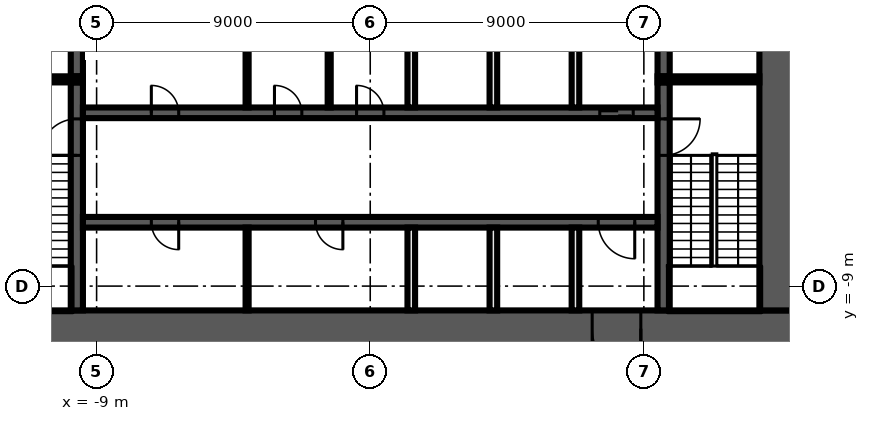
"""IFC4 building model, lengths in metres.
Left out: names, types, materials, properties, quantities, classifications, styles, units other than length and angle.
Written with IfcOpenShell. Run it as: python <this file> out.ifc"""

import sys

from ifc_helpers import new_model, si_unit, direction, frame, frame_2d, origin, place, context, subcontext, project, spatial, rectangle, extrude, element, fill, save


model = new_model("IFC4")
c1 = context("Model", 3, precision=1e-05, world=origin(), true_north=direction((0.0, 1.0)))
c2 = subcontext(c1, "Body", "Model", "MODEL_VIEW")
j1 = project(units=[si_unit("LENGTHUNIT", "METRE"), si_unit("PLANEANGLEUNIT", "RADIAN")], contexts=[c1])
p1 = place(None, origin())
s1 = spatial("IfcSite", under=j1, at=p1, CompositionType="ELEMENT")
p2 = place(p1, origin())
s2 = spatial("IfcBuilding", under=s1, at=p2, CompositionType="ELEMENT")
p3 = place(p2, frame((0.0, 0.0, 33.0)))
s3 = spatial("IfcBuildingStorey", under=s2, at=p3, CompositionType="ELEMENT", Elevation=33.0)
p4 = place(p3, frame((14.0, -10.4, 0.0), z_axis=(0.0, 0.0, 1.0), x_axis=(-1.0, 0.0, 0.0)))
e1 = element("IfcWall", 1, at=p4, inside=s3, PredefinedType="SHEAR", context=c2, shape_type="SweptSolid", body=[
    extrude(rectangle(XDim=28.0, YDim=1.2, at=frame_2d((14.0, 0.0))), origin(), (0.0, 0.0, 1.0), 4.6),
])
p5 = place(p4, frame((5.1, 0.0, 0.0)))
e2 = element("IfcOpeningElement", 2, at=p5, cuts=e1, PredefinedType="OPENING", context=c2, shape_type="SweptSolid", body=[
    extrude(rectangle(XDim=1.6, YDim=2.1, at=frame_2d((0.8, 1.05))), frame((0.0, 0.61, 0.0), z_axis=(0.0, -1.0, 0.0), x_axis=(1.0, 0.0, 0.0)), (0.0, 0.0, 1.0), 1.22),
])
p6 = place(p3, frame((13.4, 9.8, 0.0), z_axis=(0.0, 0.0, 1.0), x_axis=(0.0, -1.0, 0.0)))
e3 = element("IfcWall", 3, at=p6, inside=s3, PredefinedType="SHEAR", context=c2, shape_type="SweptSolid", body=[
    extrude(rectangle(XDim=19.6, YDim=1.2, at=frame_2d((9.8, 0.0))), origin(), (0.0, 0.0, 1.0), 4.6),
])
p7 = place(p3, frame((9.65, -2.3, 0.0), z_axis=(0.0, 0.0, 1.0), x_axis=(0.0, -1.0, 0.0)))
e4 = element("IfcWall", 4, at=p7, inside=s3, PredefinedType="SHEAR", context=c2, shape_type="SweptSolid", body=[
    extrude(rectangle(XDim=7.5, YDim=0.4, at=frame_2d((3.75, 0.0))), origin(), (0.0, 0.0, 1.0), 4.6),
])
p8 = place(p7, frame((1.2, 0.0, 0.0)))
e5 = element("IfcOpeningElement", 5, at=p8, cuts=e4, PredefinedType="OPENING", context=c2, shape_type="SweptSolid", body=[
    extrude(rectangle(XDim=1.2, YDim=2.1, at=frame_2d((0.6, 1.05))), frame((0.0, 0.21, 0.0), z_axis=(0.0, -1.0, 0.0), x_axis=(1.0, 0.0, 0.0)), (0.0, 0.0, 1.0), 0.42),
])
p9 = place(p3, frame((9.65, 2.1, 0.0), z_axis=(0.0, 0.0, 1.0), x_axis=(0.0, -1.0, 0.0)))
e6 = element("IfcWall", 6, at=p9, inside=s3, PredefinedType="SHEAR", context=c2, shape_type="SweptSolid", body=[
    extrude(rectangle(XDim=4.2, YDim=0.4, at=frame_2d((2.1, 0.0))), origin(), (0.0, 0.0, 1.0), 4.6),
])
p10 = place(p9, frame((0.15, 0.0, 0.0)))
e7 = element("IfcOpeningElement", 7, at=p10, cuts=e6, PredefinedType="OPENING", context=c2, shape_type="SweptSolid", body=[
    extrude(rectangle(XDim=0.9, YDim=2.1, at=frame_2d((0.45, 1.05))), frame((0.0, 0.21, 0.0), z_axis=(0.0, -1.0, 0.0), x_axis=(1.0, 0.0, 0.0)), (0.0, 0.0, 1.0), 0.42),
])
p11 = place(p3, frame((-9.65, -9.8, 0.0), z_axis=(0.0, 0.0, 1.0), x_axis=(0.0, 1.0, 0.0)))
e8 = element("IfcWall", 8, at=p11, inside=s3, PredefinedType="SHEAR", context=c2, shape_type="SweptSolid", body=[
    extrude(rectangle(XDim=7.5, YDim=0.4, at=frame_2d((3.75, 0.0))), origin(), (0.0, 0.0, 1.0), 4.6),
])
p12 = place(p11, frame((5.1, 0.0, 0.0)))
e9 = element("IfcOpeningElement", 9, at=p12, cuts=e8, PredefinedType="OPENING", context=c2, shape_type="SweptSolid", body=[
    extrude(rectangle(XDim=1.2, YDim=2.1, at=frame_2d((0.6, 1.05))), frame((0.0, 0.21, 0.0), z_axis=(0.0, -1.0, 0.0), x_axis=(1.0, 0.0, 0.0)), (0.0, 0.0, 1.0), 0.42),
])
p13 = place(p3, frame((-9.65, -2.1, 0.0), z_axis=(0.0, 0.0, 1.0), x_axis=(0.0, 1.0, 0.0)))
e10 = element("IfcWall", 10, at=p13, inside=s3, PredefinedType="SHEAR", context=c2, shape_type="SweptSolid", body=[
    extrude(rectangle(XDim=4.2, YDim=0.4, at=frame_2d((2.1, 0.0))), origin(), (0.0, 0.0, 1.0), 4.6),
])
for number, where, z_axis, x_axis in (
    (11, (9.45, -2.2, 0.0), (0.0, 0.0, 1.0), (1.0, 0.0, 0.0)),
    (12, (-9.45, -2.2, 0.0), (0.0, 0.0, 1.0), (-1.0, 0.0, 0.0)),
):
    element("IfcWall", number, at=place(p3, frame(where, z_axis=z_axis, x_axis=x_axis)), inside=s3, PredefinedType="SHEAR", context=c2, shape_type="SweptSolid", body=[
        extrude(rectangle(XDim=3.35, YDim=0.2, at=frame_2d((1.675, 0.0))), origin(), (0.0, 0.0, 1.0), 4.6),
    ])
p14 = place(p3, frame((-9.45, -3.3, 0.0), z_axis=(0.0, 0.0, 1.0), x_axis=(1.0, 0.0, 0.0)))
e13 = element("IfcWall", 13, at=p14, inside=s3, PredefinedType="SHEAR", context=c2, shape_type="SweptSolid", body=[
    extrude(rectangle(XDim=18.9, YDim=0.35, at=frame_2d((9.45, 0.0))), origin(), (0.0, 0.0, 1.0), 4.6),
])
p15 = place(p14, frame((17.0, 0.0, 0.0)))
e14 = element("IfcOpeningElement", 14, at=p15, cuts=e13, PredefinedType="OPENING", context=c2, shape_type="SweptSolid", body=[
    extrude(rectangle(XDim=1.1, YDim=2.1, at=frame_2d((0.55, 1.05))), frame((0.0, 0.185, 0.0), z_axis=(0.0, -1.0, 0.0), x_axis=(1.0, 0.0, 0.0)), (0.0, 0.0, 1.0), 0.37),
])
p16 = place(p14, frame((2.25, 0.0, 0.0)))
e15 = element("IfcOpeningElement", 15, at=p16, cuts=e13, PredefinedType="OPENING", context=c2, shape_type="SweptSolid", body=[
    extrude(rectangle(XDim=0.9, YDim=2.1, at=frame_2d((0.45, 1.05))), frame((0.0, 0.185, 0.0), z_axis=(0.0, -1.0, 0.0), x_axis=(1.0, 0.0, 0.0)), (0.0, 0.0, 1.0), 0.37),
])
p17 = place(p14, frame((6.3, 0.0, 0.0)))
e16 = element("IfcOpeningElement", 16, at=p17, cuts=e13, PredefinedType="OPENING", context=c2, shape_type="SweptSolid", body=[
    extrude(rectangle(XDim=0.9, YDim=2.1, at=frame_2d((0.45, 1.05))), frame((0.0, 0.185, 0.0), z_axis=(0.0, -1.0, 0.0), x_axis=(1.0, 0.0, 0.0)), (0.0, 0.0, 1.0), 0.37),
])
p18 = place(p14, frame((9.0, 0.0, 0.0)))
e17 = element("IfcOpeningElement", 17, at=p18, cuts=e13, PredefinedType="OPENING", context=c2, shape_type="SweptSolid", body=[
    extrude(rectangle(XDim=0.9, YDim=2.1, at=frame_2d((0.45, 1.05))), frame((0.0, 0.185, 0.0), z_axis=(0.0, -1.0, 0.0), x_axis=(1.0, 0.0, 0.0)), (0.0, 0.0, 1.0), 0.37),
])
p19 = place(p3, frame((9.45, -6.9, 0.0), z_axis=(0.0, 0.0, 1.0), x_axis=(-1.0, 0.0, 0.0)))
e18 = element("IfcWall", 18, at=p19, inside=s3, PredefinedType="SHEAR", context=c2, shape_type="SweptSolid", body=[
    extrude(rectangle(XDim=18.9, YDim=0.35, at=frame_2d((9.45, 0.0))), origin(), (0.0, 0.0, 1.0), 4.6),
])
p20 = place(p19, frame((0.75, 0.0, 0.0)))
e19 = element("IfcOpeningElement", 19, at=p20, cuts=e18, PredefinedType="OPENING", context=c2, shape_type="SweptSolid", body=[
    extrude(rectangle(XDim=1.2, YDim=2.1, at=frame_2d((0.6, 1.05))), frame((0.0, 0.185, 0.0), z_axis=(0.0, -1.0, 0.0), x_axis=(1.0, 0.0, 0.0)), (0.0, 0.0, 1.0), 0.37),
])
p21 = place(p19, frame((15.75, 0.0, 0.0)))
e20 = element("IfcOpeningElement", 20, at=p21, cuts=e18, PredefinedType="OPENING", context=c2, shape_type="SweptSolid", body=[
    extrude(rectangle(XDim=0.9, YDim=2.1, at=frame_2d((0.45, 1.05))), frame((0.0, 0.185, 0.0), z_axis=(0.0, -1.0, 0.0), x_axis=(1.0, 0.0, 0.0)), (0.0, 0.0, 1.0), 0.37),
])
p22 = place(p19, frame((10.35, 0.0, 0.0)))
e21 = element("IfcOpeningElement", 21, at=p22, cuts=e18, PredefinedType="OPENING", context=c2, shape_type="SweptSolid", body=[
    extrude(rectangle(XDim=0.9, YDim=2.1, at=frame_2d((0.45, 1.05))), frame((0.0, 0.185, 0.0), z_axis=(0.0, -1.0, 0.0), x_axis=(1.0, 0.0, 0.0)), (0.0, 0.0, 1.0), 0.37),
])
for number, where, z_axis, x_axis in (
    (22, (6.75, -9.8, 0.0), (0.0, 0.0, 1.0), (0.0, 1.0, 0.0)),
    (23, (6.75, -3.125, 0.0), (0.0, 0.0, 1.0), (0.0, 1.0, 0.0)),
    (24, (4.05, -9.8, 0.0), (0.0, 0.0, 1.0), (0.0, 1.0, 0.0)),
    (25, (4.05, -3.125, 0.0), (0.0, 0.0, 1.0), (0.0, 1.0, 0.0)),
    (26, (1.35, -9.8, 0.0), (0.0, 0.0, 1.0), (0.0, 1.0, 0.0)),
    (27, (1.35, -3.125, 0.0), (0.0, 0.0, 1.0), (0.0, 1.0, 0.0)),
):
    element("IfcWall", number, at=place(p3, frame(where, z_axis=z_axis, x_axis=x_axis)), inside=s3, PredefinedType="SOLIDWALL", context=c2, shape_type="SweptSolid", body=[
        extrude(rectangle(XDim=2.725, YDim=0.25, at=frame_2d((1.363, 0.0))), origin(), (0.0, 0.0, 1.0), 4.6),
    ])
for number, where, z_axis, x_axis in (
    (28, (-1.35, -3.125, 0.0), (0.0, 0.0, 1.0), (0.0, 1.0, 0.0)),
    (29, (-4.05, -9.8, 0.0), (0.0, 0.0, 1.0), (0.0, 1.0, 0.0)),
    (30, (-4.05, -3.125, 0.0), (0.0, 0.0, 1.0), (0.0, 1.0, 0.0)),
):
    element("IfcWall", number, at=place(p3, frame(where, z_axis=z_axis, x_axis=x_axis)), inside=s3, PredefinedType="PARTITIONING", context=c2, shape_type="SweptSolid", body=[
        extrude(rectangle(XDim=2.725, YDim=0.1, at=frame_2d((1.363, 0.0))), origin(), (0.0, 0.0, 1.0), 4.6),
    ])
p23 = place(p15, origin())
e31 = element("IfcDoor", 31, at=p23, inside=s3, OperationType="DOUBLE_DOOR_SLIDING", PredefinedType="DOOR", context=c2, shape_type="SweptSolid", body=[
    extrude(rectangle(XDim=1.1, YDim=2.1, at=frame_2d((0.55, 1.05))), frame((0.0, 0.025, 0.0), z_axis=(0.0, -1.0, 0.0), x_axis=(1.0, 0.0, 0.0)), (0.0, 0.0, 1.0), 0.05),
])
fill(e14, e31)
p24 = place(p5, origin())
e32 = element("IfcDoor", 32, at=p24, inside=s3, OperationType="DOUBLE_DOOR_SINGLE_SWING", PredefinedType="DOOR", context=c2, shape_type="SweptSolid", body=[
    extrude(rectangle(XDim=1.6, YDim=2.1, at=frame_2d((0.8, 1.05))), frame((0.0, 0.025, 0.0), z_axis=(0.0, -1.0, 0.0), x_axis=(1.0, 0.0, 0.0)), (0.0, 0.0, 1.0), 0.05),
])
fill(e2, e32)
p25 = place(p20, origin())
e33 = element("IfcDoor", 33, at=p25, inside=s3, OperationType="SINGLE_SWING_LEFT", PredefinedType="DOOR", context=c2, shape_type="SweptSolid", body=[
    extrude(rectangle(XDim=1.2, YDim=2.1, at=frame_2d((0.6, 1.05))), frame((0.0, 0.025, 0.0), z_axis=(0.0, -1.0, 0.0), x_axis=(1.0, 0.0, 0.0)), (0.0, 0.0, 1.0), 0.05),
])
fill(e19, e33)
p26 = place(p16, origin())
e34 = element("IfcDoor", 34, at=p26, inside=s3, OperationType="SINGLE_SWING_RIGHT", PredefinedType="DOOR", context=c2, shape_type="SweptSolid", body=[
    extrude(rectangle(XDim=0.9, YDim=2.1, at=frame_2d((0.45, 1.05))), frame((0.0, 0.025, 0.0), z_axis=(0.0, -1.0, 0.0), x_axis=(1.0, 0.0, 0.0)), (0.0, 0.0, 1.0), 0.05),
])
fill(e15, e34)
p27 = place(p17, origin())
e35 = element("IfcDoor", 35, at=p27, inside=s3, OperationType="SINGLE_SWING_LEFT", PredefinedType="DOOR", context=c2, shape_type="SweptSolid", body=[
    extrude(rectangle(XDim=0.9, YDim=2.1, at=frame_2d((0.45, 1.05))), frame((0.0, 0.025, 0.0), z_axis=(0.0, -1.0, 0.0), x_axis=(1.0, 0.0, 0.0)), (0.0, 0.0, 1.0), 0.05),
])
fill(e16, e35)
p28 = place(p18, origin())
e36 = element("IfcDoor", 36, at=p28, inside=s3, OperationType="SINGLE_SWING_RIGHT", PredefinedType="DOOR", context=c2, shape_type="SweptSolid", body=[
    extrude(rectangle(XDim=0.9, YDim=2.1, at=frame_2d((0.45, 1.05))), frame((0.0, 0.025, 0.0), z_axis=(0.0, -1.0, 0.0), x_axis=(1.0, 0.0, 0.0)), (0.0, 0.0, 1.0), 0.05),
])
fill(e17, e36)
p29 = place(p21, origin())
e37 = element("IfcDoor", 37, at=p29, inside=s3, OperationType="SINGLE_SWING_LEFT", PredefinedType="DOOR", context=c2, shape_type="SweptSolid", body=[
    extrude(rectangle(XDim=0.9, YDim=2.1, at=frame_2d((0.45, 1.05))), frame((0.0, 0.025, 0.0), z_axis=(0.0, -1.0, 0.0), x_axis=(1.0, 0.0, 0.0)), (0.0, 0.0, 1.0), 0.05),
])
fill(e20, e37)
p30 = place(p22, origin())
e38 = element("IfcDoor", 38, at=p30, inside=s3, OperationType="SINGLE_SWING_RIGHT", PredefinedType="DOOR", context=c2, shape_type="SweptSolid", body=[
    extrude(rectangle(XDim=0.9, YDim=2.1, at=frame_2d((0.45, 1.05))), frame((0.0, 0.025, 0.0), z_axis=(0.0, -1.0, 0.0), x_axis=(1.0, 0.0, 0.0)), (0.0, 0.0, 1.0), 0.05),
])
fill(e21, e38)
p31 = place(p8, origin())
e39 = element("IfcDoor", 39, at=p31, inside=s3, OperationType="SINGLE_SWING_RIGHT", PredefinedType="DOOR", context=c2, shape_type="SweptSolid", body=[
    extrude(rectangle(XDim=1.2, YDim=2.1, at=frame_2d((0.6, 1.05))), frame((0.0, 0.025, 0.0), z_axis=(0.0, -1.0, 0.0), x_axis=(1.0, 0.0, 0.0)), (0.0, 0.0, 1.0), 0.05),
])
fill(e5, e39)
p32 = place(p12, origin())
e40 = element("IfcDoor", 40, at=p32, inside=s3, OperationType="SINGLE_SWING_LEFT", PredefinedType="DOOR", context=c2, shape_type="SweptSolid", body=[
    extrude(rectangle(XDim=1.2, YDim=2.1, at=frame_2d((0.6, 1.05))), frame((0.0, 0.025, 0.0), z_axis=(0.0, -1.0, 0.0), x_axis=(1.0, 0.0, 0.0)), (0.0, 0.0, 1.0), 0.05),
])
fill(e9, e40)
save(model, sys.argv[1])
